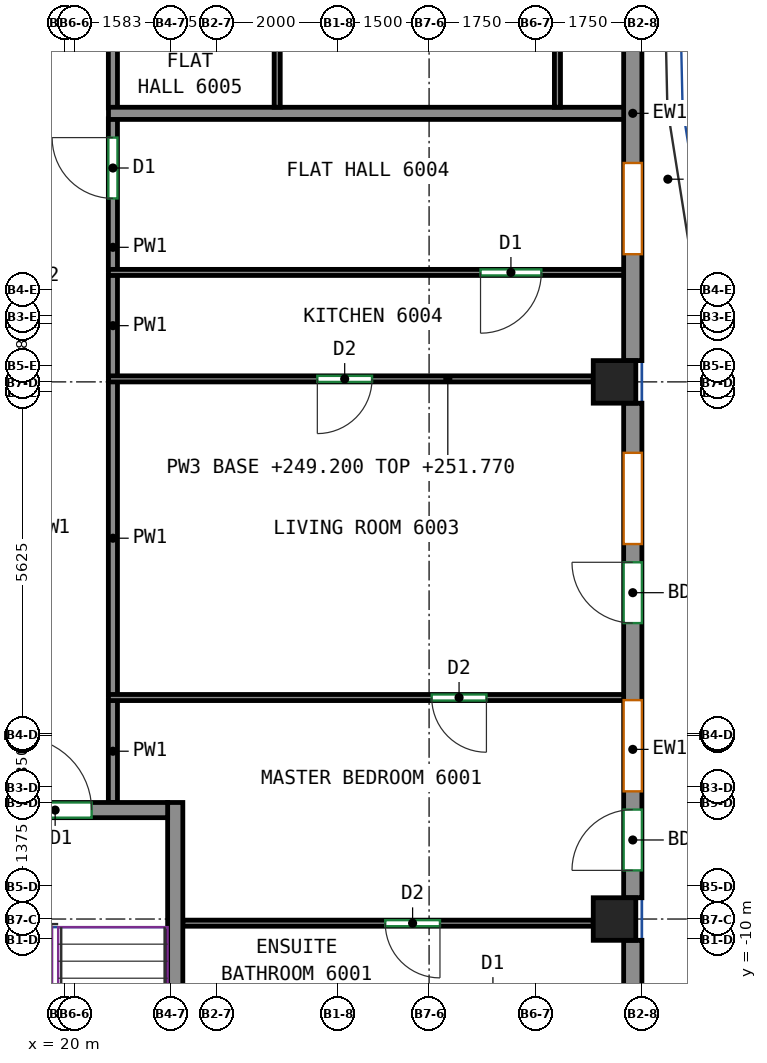
"""IFC4 building model, lengths in metres.
Left out: names, types, materials, properties, quantities, classifications, styles, units other than length and angle.
Written with IfcOpenShell. Run it as: python <this file> out.ifc"""

import sys

from ifc_helpers import new_model, si_unit, direction, frame, frame_2d, origin, origin_2d, place, context, subcontext, project, spatial, rectangle, extrude, source, transform, mapped, element, fill, save


model = new_model("IFC4")
c1 = context("Model", 3, precision=1e-05, world=origin(), true_north=direction((0.0, 1.0)))
c2 = subcontext(c1, "Body", "Model", "MODEL_VIEW")
j1 = project(units=[si_unit("LENGTHUNIT", "METRE"), si_unit("PLANEANGLEUNIT", "RADIAN")], contexts=[c1])
p1 = place(None, origin())
s1 = spatial("IfcSite", under=j1, at=p1, CompositionType="ELEMENT")
p2 = place(p1, origin())
s2 = spatial("IfcBuilding", under=s1, at=p2, CompositionType="ELEMENT")
p3 = place(p2, frame((0.0, 0.0, 249.2)))
s3 = spatial("IfcBuildingStorey", under=s2, at=p3, CompositionType="ELEMENT", Elevation=249.2)
m1 = source(origin(), c2, "Body", "SweptSolid", [
    extrude(rectangle(XDim=0.7, YDim=0.7, at=origin_2d()), origin(), (0.0, 0.0, 1.0), 3.12),
])
for number, where, z_axis, x_axis in (
    (1, (29.05, -9.667, 0.0), (0.0, 0.0, 1.0), (1.0, 0.0, 0.0)),
    (2, (29.05, -0.833, 0.0), (0.0, 0.0, 1.0), (1.0, 0.0, 0.0)),
):
    element("IfcColumn", number, at=place(p3, frame(where, z_axis=z_axis, x_axis=x_axis)), inside=s3, PredefinedType="COLUMN", context=c2, shape_type="MappedRepresentation", body=[
        mapped(m1, transform((0.0, 0.0, 0.0))),
    ])
m2 = source(origin(), c2, "Body", "SweptSolid", [
    extrude(rectangle(XDim=8.0, YDim=0.25, at=frame_2d((4.0, 0.0))), origin(), (0.0, 0.0, 1.0), 3.12),
])
p4 = place(p3, frame((21.825, -15.75, 0.0), z_axis=(0.0, 0.0, 1.0), x_axis=(0.0, 1.0, 0.0)))
e3 = element("IfcWall", 3, at=p4, inside=s3, PredefinedType="SHEAR", context=c2, shape_type="MappedRepresentation", body=[
    mapped(m2, transform((0.0, 0.0, 0.0))),
])
m3 = source(origin(), c2, "Body", "SweptSolid", [
    extrude(rectangle(XDim=3.7, YDim=0.25, at=frame_2d((1.85, 0.0))), origin(), (0.0, 0.0, 1.0), 3.12),
])
p5 = place(p3, frame((18.0, -7.875, 0.0), z_axis=(0.0, 0.0, 1.0), x_axis=(1.0, 0.0, 0.0)))
e4 = element("IfcWall", 4, at=p5, inside=s3, PredefinedType="SHEAR", context=c2, shape_type="MappedRepresentation", body=[
    mapped(m3, transform((0.0, 0.0, 0.0))),
])
p6 = place(p5, frame((1.25, 0.0, 0.0)))
e5 = element("IfcOpeningElement", 5, at=p6, cuts=e4, PredefinedType="OPENING", context=c2, shape_type="SweptSolid", body=[
    extrude(rectangle(XDim=1.2, YDim=2.1, at=frame_2d((0.6, 1.05))), frame((0.0, 0.135, 0.0), z_axis=(0.0, -1.0, 0.0), x_axis=(1.0, 0.0, 0.0)), (0.0, 0.0, 1.0), 0.27),
])
m4 = source(origin(), c2, "Body", "SweptSolid", [
    extrude(rectangle(XDim=4.315, YDim=0.3, at=frame_2d((2.158, 0.0))), origin(), (0.0, 0.0, 1.0), 3.12),
])
p7 = place(p3, frame((29.35, -14.332, 0.0), z_axis=(0.0, 0.0, 1.0), x_axis=(0.0, 1.0, 0.0)))
e6 = element("IfcWall", 6, at=p7, inside=s3, PredefinedType="SOLIDWALL", context=c2, shape_type="MappedRepresentation", body=[
    mapped(m4, transform((0.0, 0.0, 0.0))),
])
p8 = place(p7, frame((1.75, 0.0, 0.8)))
e7 = element("IfcOpeningElement", 7, at=p8, cuts=e6, PredefinedType="OPENING", context=c2, shape_type="SweptSolid", body=[
    extrude(rectangle(XDim=1.5, YDim=2.05, at=frame_2d((0.75, 1.025))), frame((0.0, 0.16, 0.0), z_axis=(0.0, -1.0, 0.0), x_axis=(1.0, 0.0, 0.0)), (0.0, 0.0, 1.0), 0.32),
])
p9 = place(p7, frame((0.45, 0.0, 0.0)))
e8 = element("IfcOpeningElement", 8, at=p9, cuts=e6, PredefinedType="OPENING", context=c2, shape_type="SweptSolid", body=[
    extrude(rectangle(XDim=1.0, YDim=2.1, at=frame_2d((0.5, 1.05))), frame((0.0, 0.16, 0.0), z_axis=(0.0, -1.0, 0.0), x_axis=(1.0, 0.0, 0.0)), (0.0, 0.0, 1.0), 0.32),
])
m5 = source(origin(), c2, "Body", "SweptSolid", [
    extrude(rectangle(XDim=8.133, YDim=0.3, at=frame_2d((4.067, 0.0))), origin(), (0.0, 0.0, 1.0), 3.12),
])
p10 = place(p3, frame((29.35, -9.317, 0.0), z_axis=(0.0, 0.0, 1.0), x_axis=(0.0, 1.0, 0.0)))
e9 = element("IfcWall", 9, at=p10, inside=s3, PredefinedType="SOLIDWALL", context=c2, shape_type="MappedRepresentation", body=[
    mapped(m5, transform((0.0, 0.0, 0.0))),
])
p11 = place(p10, frame((1.75, 0.0, 0.8)))
e10 = element("IfcOpeningElement", 10, at=p11, cuts=e9, PredefinedType="OPENING", context=c2, shape_type="SweptSolid", body=[
    extrude(rectangle(XDim=1.5, YDim=2.05, at=frame_2d((0.75, 1.025))), frame((0.0, 0.16, 0.0), z_axis=(0.0, -1.0, 0.0), x_axis=(1.0, 0.0, 0.0)), (0.0, 0.0, 1.0), 0.32),
])
p12 = place(p10, frame((0.45, 0.0, 0.0)))
e11 = element("IfcOpeningElement", 11, at=p12, cuts=e9, PredefinedType="OPENING", context=c2, shape_type="SweptSolid", body=[
    extrude(rectangle(XDim=1.0, YDim=2.1, at=frame_2d((0.5, 1.05))), frame((0.0, 0.16, 0.0), z_axis=(0.0, -1.0, 0.0), x_axis=(1.0, 0.0, 0.0)), (0.0, 0.0, 1.0), 0.32),
])
p13 = place(p10, frame((5.817, 0.0, 0.8)))
e12 = element("IfcOpeningElement", 12, at=p13, cuts=e9, PredefinedType="OPENING", context=c2, shape_type="SweptSolid", body=[
    extrude(rectangle(XDim=1.5, YDim=2.05, at=frame_2d((0.75, 1.025))), frame((0.0, 0.16, 0.0), z_axis=(0.0, -1.0, 0.0), x_axis=(1.0, 0.0, 0.0)), (0.0, 0.0, 1.0), 0.32),
])
p14 = place(p10, frame((4.517, 0.0, 0.0)))
e13 = element("IfcOpeningElement", 13, at=p14, cuts=e9, PredefinedType="OPENING", context=c2, shape_type="SweptSolid", body=[
    extrude(rectangle(XDim=1.0, YDim=2.1, at=frame_2d((0.5, 1.05))), frame((0.0, 0.16, 0.0), z_axis=(0.0, -1.0, 0.0), x_axis=(1.0, 0.0, 0.0)), (0.0, 0.0, 1.0), 0.32),
])
p15 = place(p3, frame((29.35, -0.483, 0.0), z_axis=(0.0, 0.0, 1.0), x_axis=(0.0, 1.0, 0.0)))
e14 = element("IfcWall", 14, at=p15, inside=s3, PredefinedType="SOLIDWALL", context=c2, shape_type="MappedRepresentation", body=[
    mapped(m5, transform((0.0, 0.0, 0.0))),
])
p16 = place(p15, frame((1.75, 0.0, 0.8)))
e15 = element("IfcOpeningElement", 15, at=p16, cuts=e14, PredefinedType="OPENING", context=c2, shape_type="SweptSolid", body=[
    extrude(rectangle(XDim=1.5, YDim=2.05, at=frame_2d((0.75, 1.025))), frame((0.0, 0.16, 0.0), z_axis=(0.0, -1.0, 0.0), x_axis=(1.0, 0.0, 0.0)), (0.0, 0.0, 1.0), 0.32),
])
p17 = place(p15, frame((5.817, 0.0, 0.8)))
e16 = element("IfcOpeningElement", 16, at=p17, cuts=e14, PredefinedType="OPENING", context=c2, shape_type="SweptSolid", body=[
    extrude(rectangle(XDim=1.5, YDim=2.05, at=frame_2d((0.75, 1.025))), frame((0.0, 0.16, 0.0), z_axis=(0.0, -1.0, 0.0), x_axis=(1.0, 0.0, 0.0)), (0.0, 0.0, 1.0), 0.32),
])
p18 = place(p3, frame((20.8, -7.75, 0.0), z_axis=(0.0, 0.0, 1.0), x_axis=(0.0, 1.0, 0.0)))
e17 = element("IfcWall", 17, at=p18, inside=s3, PredefinedType="PARTITIONING", context=c2, shape_type="SweptSolid", body=[
    extrude(rectangle(XDim=1.686, YDim=0.15, at=frame_2d((0.843, 0.0))), origin(), (0.0, 0.0, 1.0), 3.12),
])
p19 = place(p3, frame((20.8, -5.984, 0.0), z_axis=(0.0, 0.0, 1.0), x_axis=(0.0, 1.0, 0.0)))
e18 = element("IfcWall", 18, at=p19, inside=s3, PredefinedType="PARTITIONING", context=c2, shape_type="SweptSolid", body=[
    extrude(rectangle(XDim=5.16, YDim=0.15, at=frame_2d((2.58, 0.0))), origin(), (0.0, 0.0, 1.0), 3.12),
])
p20 = place(p3, frame((20.8, -0.744, 0.0), z_axis=(0.0, 0.0, 1.0), x_axis=(0.0, 1.0, 0.0)))
e19 = element("IfcWall", 19, at=p20, inside=s3, PredefinedType="PARTITIONING", context=c2, shape_type="SweptSolid", body=[
    extrude(rectangle(XDim=1.671, YDim=0.15, at=frame_2d((0.835, 0.0))), origin(), (0.0, 0.0, 1.0), 3.12),
])
p21 = place(p3, frame((20.8, 1.007, 0.0), z_axis=(0.0, 0.0, 1.0), x_axis=(0.0, 1.0, 0.0)))
e20 = element("IfcWall", 20, at=p21, inside=s3, PredefinedType="PARTITIONING", context=c2, shape_type="SweptSolid", body=[
    extrude(rectangle(XDim=2.486, YDim=0.15, at=frame_2d((1.243, 0.0))), origin(), (0.0, 0.0, 1.0), 3.12),
])
p22 = place(p21, frame((1.177, 0.0, 0.0)))
e21 = element("IfcOpeningElement", 21, at=p22, cuts=e20, PredefinedType="OPENING", context=c2, shape_type="SweptSolid", body=[
    extrude(rectangle(XDim=1.0, YDim=2.1, at=frame_2d((0.5, 1.05))), frame((0.0, 0.085, 0.0), z_axis=(0.0, -1.0, 0.0), x_axis=(1.0, 0.0, 0.0)), (0.0, 0.0, 1.0), 0.17),
])
p23 = place(p3, frame((20.8, 3.673, 0.0), z_axis=(0.0, 0.0, 1.0), x_axis=(0.0, 1.0, 0.0)))
e22 = element("IfcWall", 22, at=p23, inside=s3, PredefinedType="PARTITIONING", context=c2, shape_type="SweptSolid", body=[
    extrude(rectangle(XDim=4.429, YDim=0.15, at=frame_2d((2.214, 0.0))), origin(), (0.0, 0.0, 1.0), 3.12),
])
p24 = place(p23, frame((2.118, 0.0, 0.0)))
e23 = element("IfcOpeningElement", 23, at=p24, cuts=e22, PredefinedType="OPENING", context=c2, shape_type="SweptSolid", body=[
    extrude(rectangle(XDim=1.0, YDim=2.1, at=frame_2d((0.5, 1.05))), frame((0.0, 0.085, 0.0), z_axis=(0.0, -1.0, 0.0), x_axis=(1.0, 0.0, 0.0)), (0.0, 0.0, 1.0), 0.17),
])
p25 = place(p3, frame((28.7, -9.735, 0.0), z_axis=(0.0, 0.0, 1.0), x_axis=(-1.0, 0.0, 0.0)))
e24 = element("IfcWall", 24, at=p25, inside=s3, PredefinedType="PARTITIONING", context=c2, shape_type="SweptSolid", body=[
    extrude(rectangle(XDim=6.75, YDim=0.1, at=frame_2d((3.375, 0.0))), origin(), (0.0, 0.0, 1.0), 3.12),
])
p26 = place(p25, frame((2.521, 0.0, 0.0)))
e25 = element("IfcOpeningElement", 25, at=p26, cuts=e24, PredefinedType="OPENING", context=c2, shape_type="SweptSolid", body=[
    extrude(rectangle(XDim=0.9, YDim=2.1, at=frame_2d((0.45, 1.05))), frame((0.0, 0.06, 0.0), z_axis=(0.0, -1.0, 0.0), x_axis=(1.0, 0.0, 0.0)), (0.0, 0.0, 1.0), 0.12),
])
p27 = place(p3, frame((29.25, -6.024, 0.0), z_axis=(0.0, 0.0, 1.0), x_axis=(-1.0, 0.0, 0.0)))
e26 = element("IfcWall", 26, at=p27, inside=s3, PredefinedType="PARTITIONING", context=c2, shape_type="SweptSolid", body=[
    extrude(rectangle(XDim=8.523, YDim=0.1, at=frame_2d((4.261, 0.0))), origin(), (0.0, 0.0, 1.0), 3.12),
])
p28 = place(p27, frame((2.307, 0.0, 0.0)))
e27 = element("IfcOpeningElement", 27, at=p28, cuts=e26, PredefinedType="OPENING", context=c2, shape_type="SweptSolid", body=[
    extrude(rectangle(XDim=0.9, YDim=2.1, at=frame_2d((0.45, 1.05))), frame((0.0, 0.06, 0.0), z_axis=(0.0, -1.0, 0.0), x_axis=(1.0, 0.0, 0.0)), (0.0, 0.0, 1.0), 0.12),
])
p29 = place(p3, frame((28.7, -0.784, 0.0), z_axis=(0.0, 0.0, 1.0), x_axis=(-1.0, 0.0, 0.0)))
e28 = element("IfcWall", 28, at=p29, inside=s3, PredefinedType="PARTITIONING", context=c2, shape_type="SweptSolid", body=[
    extrude(rectangle(XDim=7.973, YDim=0.1, at=frame_2d((3.986, 0.0))), origin(), (0.0, 0.0, 1.0), 2.57),
])
p30 = place(p29, frame((3.638, 0.0, 0.0)))
e29 = element("IfcOpeningElement", 29, at=p30, cuts=e28, PredefinedType="OPENING", context=c2, shape_type="SweptSolid", body=[
    extrude(rectangle(XDim=0.9, YDim=2.1, at=frame_2d((0.45, 1.05))), frame((0.0, 0.06, 0.0), z_axis=(0.0, -1.0, 0.0), x_axis=(1.0, 0.0, 0.0)), (0.0, 0.0, 1.0), 0.12),
])
p31 = place(p3, frame((29.25, 0.967, 0.0), z_axis=(0.0, 0.0, 1.0), x_axis=(-1.0, 0.0, 0.0)))
e30 = element("IfcWall", 30, at=p31, inside=s3, PredefinedType="PARTITIONING", context=c2, shape_type="SweptSolid", body=[
    extrude(rectangle(XDim=8.523, YDim=0.1, at=frame_2d((4.261, 0.0))), origin(), (0.0, 0.0, 1.0), 3.12),
])
p32 = place(p31, frame((1.404, 0.0, 0.0)))
e31 = element("IfcOpeningElement", 31, at=p32, cuts=e30, PredefinedType="OPENING", context=c2, shape_type="SweptSolid", body=[
    extrude(rectangle(XDim=1.0, YDim=2.1, at=frame_2d((0.5, 1.05))), frame((0.0, 0.06, 0.0), z_axis=(0.0, -1.0, 0.0), x_axis=(1.0, 0.0, 0.0)), (0.0, 0.0, 1.0), 0.12),
])
p33 = place(p3, frame((20.727, 3.583, 0.0), z_axis=(0.0, 0.0, 1.0), x_axis=(1.0, 0.0, 0.0)))
e32 = element("IfcWall", 32, at=p33, inside=s3, PredefinedType="PARTITIONING", context=c2, shape_type="SweptSolid", body=[
    extrude(rectangle(XDim=8.523, YDim=0.2, at=frame_2d((4.261, 0.0))), origin(), (0.0, 0.0, 1.0), 3.12),
])
p34 = place(p3, frame((23.502, 3.683, 0.0), z_axis=(0.0, 0.0, 1.0), x_axis=(0.0, 1.0, 0.0)))
e33 = element("IfcWall", 33, at=p34, inside=s3, PredefinedType="PARTITIONING", context=c2, shape_type="SweptSolid", body=[
    extrude(rectangle(XDim=3.158, YDim=0.1, at=frame_2d((1.579, 0.0))), origin(), (0.0, 0.0, 1.0), 3.12),
])
p35 = place(p34, frame((1.338, 0.0, 0.0)))
e34 = element("IfcOpeningElement", 34, at=p35, cuts=e33, PredefinedType="OPENING", context=c2, shape_type="SweptSolid", body=[
    extrude(rectangle(XDim=1.0, YDim=2.1, at=frame_2d((0.5, 1.05))), frame((0.0, 0.06, 0.0), z_axis=(0.0, -1.0, 0.0), x_axis=(1.0, 0.0, 0.0)), (0.0, 0.0, 1.0), 0.12),
])
p36 = place(p3, frame((28.111, 3.683, 0.0), z_axis=(0.0, 0.0, 1.0), x_axis=(0.0, 1.0, 0.0)))
e35 = element("IfcWall", 35, at=p36, inside=s3, PredefinedType="PARTITIONING", context=c2, shape_type="SweptSolid", body=[
    extrude(rectangle(XDim=9.058, YDim=0.1, at=frame_2d((4.529, 0.0))), origin(), (0.0, 0.0, 1.0), 3.12),
])
p37 = place(p36, frame((4.734, 0.0, 0.0)))
e36 = element("IfcOpeningElement", 36, at=p37, cuts=e35, PredefinedType="OPENING", context=c2, shape_type="SweptSolid", body=[
    extrude(rectangle(XDim=0.9, YDim=2.1, at=frame_2d((0.45, 1.05))), frame((0.0, 0.06, 0.0), z_axis=(0.0, -1.0, 0.0), x_axis=(1.0, 0.0, 0.0)), (0.0, 0.0, 1.0), 0.12),
])
p38 = place(p11, origin())
e37 = element("IfcWindow", 37, at=p38, inside=s3, PartitioningType="SINGLE_PANEL", PredefinedType="WINDOW", context=c2, shape_type="SweptSolid", body=[
    extrude(rectangle(XDim=1.5, YDim=2.05, at=frame_2d((0.75, 1.025))), frame((0.0, 0.03, 0.0), z_axis=(0.0, -1.0, 0.0), x_axis=(1.0, 0.0, 0.0)), (0.0, 0.0, 1.0), 0.06),
])
fill(e10, e37)
p39 = place(p12, origin())
e38 = element("IfcDoor", 38, at=p39, inside=s3, OperationType="SINGLE_SWING_LEFT", PredefinedType="DOOR", context=c2, shape_type="SweptSolid", body=[
    extrude(rectangle(XDim=1.0, YDim=2.1, at=frame_2d((0.5, 1.05))), frame((0.0, 0.025, 0.0), z_axis=(0.0, -1.0, 0.0), x_axis=(1.0, 0.0, 0.0)), (0.0, 0.0, 1.0), 0.05),
])
fill(e11, e38)
p40 = place(p13, origin())
e39 = element("IfcWindow", 39, at=p40, inside=s3, PartitioningType="SINGLE_PANEL", PredefinedType="WINDOW", context=c2, shape_type="SweptSolid", body=[
    extrude(rectangle(XDim=1.5, YDim=2.05, at=frame_2d((0.75, 1.025))), frame((0.0, 0.03, 0.0), z_axis=(0.0, -1.0, 0.0), x_axis=(1.0, 0.0, 0.0)), (0.0, 0.0, 1.0), 0.06),
])
fill(e12, e39)
p41 = place(p14, origin())
e40 = element("IfcDoor", 40, at=p41, inside=s3, OperationType="SINGLE_SWING_RIGHT", PredefinedType="DOOR", context=c2, shape_type="SweptSolid", body=[
    extrude(rectangle(XDim=1.0, YDim=2.1, at=frame_2d((0.5, 1.05))), frame((0.0, 0.025, 0.0), z_axis=(0.0, -1.0, 0.0), x_axis=(1.0, 0.0, 0.0)), (0.0, 0.0, 1.0), 0.05),
])
fill(e13, e40)
p42 = place(p16, origin())
e41 = element("IfcWindow", 41, at=p42, inside=s3, PartitioningType="SINGLE_PANEL", PredefinedType="WINDOW", context=c2, shape_type="SweptSolid", body=[
    extrude(rectangle(XDim=1.5, YDim=2.05, at=frame_2d((0.75, 1.025))), frame((0.0, 0.03, 0.0), z_axis=(0.0, -1.0, 0.0), x_axis=(1.0, 0.0, 0.0)), (0.0, 0.0, 1.0), 0.06),
])
fill(e15, e41)
p43 = place(p6, origin())
e42 = element("IfcDoor", 42, at=p43, inside=s3, OperationType="DOUBLE_DOOR_SINGLE_SWING", PredefinedType="DOOR", context=c2, shape_type="SweptSolid", body=[
    extrude(rectangle(XDim=1.2, YDim=2.1, at=frame_2d((0.6, 1.05))), frame((0.0, 0.025, 0.0), z_axis=(0.0, -1.0, 0.0), x_axis=(1.0, 0.0, 0.0)), (0.0, 0.0, 1.0), 0.05),
])
fill(e5, e42)
p44 = place(p26, origin())
e43 = element("IfcDoor", 43, at=p44, inside=s3, OperationType="SINGLE_SWING_LEFT", PredefinedType="DOOR", context=c2, shape_type="SweptSolid", body=[
    extrude(rectangle(XDim=0.9, YDim=2.1, at=frame_2d((0.45, 1.05))), frame((0.0, 0.025, 0.0), z_axis=(0.0, -1.0, 0.0), x_axis=(1.0, 0.0, 0.0)), (0.0, 0.0, 1.0), 0.05),
])
fill(e25, e43)
p45 = place(p28, origin())
e44 = element("IfcDoor", 44, at=p45, inside=s3, OperationType="SINGLE_SWING_LEFT", PredefinedType="DOOR", context=c2, shape_type="SweptSolid", body=[
    extrude(rectangle(XDim=0.9, YDim=2.1, at=frame_2d((0.45, 1.05))), frame((0.0, 0.025, 0.0), z_axis=(0.0, -1.0, 0.0), x_axis=(1.0, 0.0, 0.0)), (0.0, 0.0, 1.0), 0.05),
])
fill(e27, e44)
p46 = place(p30, origin())
e45 = element("IfcDoor", 45, at=p46, inside=s3, OperationType="SINGLE_SWING_RIGHT", PredefinedType="DOOR", context=c2, shape_type="SweptSolid", body=[
    extrude(rectangle(XDim=0.9, YDim=2.1, at=frame_2d((0.45, 1.05))), frame((0.0, 0.025, 0.0), z_axis=(0.0, -1.0, 0.0), x_axis=(1.0, 0.0, 0.0)), (0.0, 0.0, 1.0), 0.05),
])
fill(e29, e45)
p47 = place(p32, origin())
e46 = element("IfcDoor", 46, at=p47, inside=s3, OperationType="SINGLE_SWING_RIGHT", PredefinedType="DOOR", context=c2, shape_type="SweptSolid", body=[
    extrude(rectangle(XDim=1.0, YDim=2.1, at=frame_2d((0.5, 1.05))), frame((0.0, 0.025, 0.0), z_axis=(0.0, -1.0, 0.0), x_axis=(1.0, 0.0, 0.0)), (0.0, 0.0, 1.0), 0.05),
])
fill(e31, e46)
p48 = place(p22, origin())
e47 = element("IfcDoor", 47, at=p48, inside=s3, OperationType="SINGLE_SWING_RIGHT", PredefinedType="DOOR", context=c2, shape_type="SweptSolid", body=[
    extrude(rectangle(XDim=1.0, YDim=2.1, at=frame_2d((0.5, 1.05))), frame((0.0, 0.025, 0.0), z_axis=(0.0, -1.0, 0.0), x_axis=(1.0, 0.0, 0.0)), (0.0, 0.0, 1.0), 0.05),
])
fill(e21, e47)
save(model, sys.argv[1])
